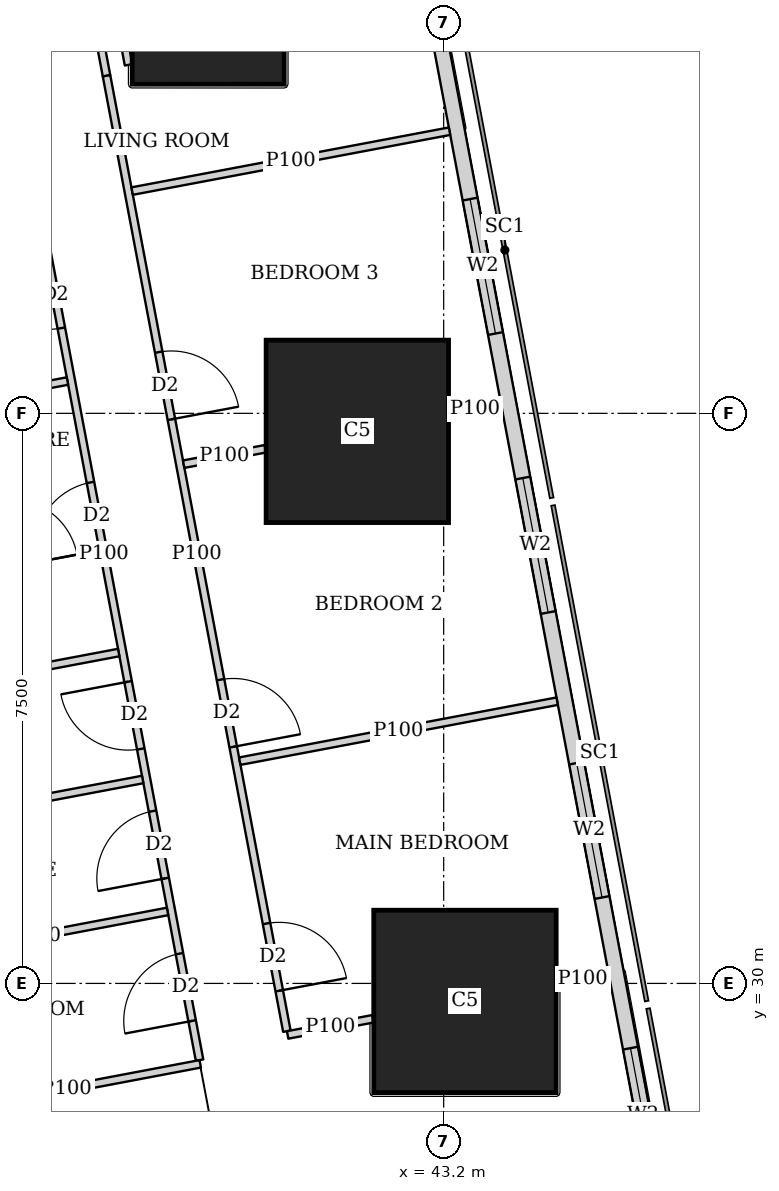
"""IFC4 building model, lengths in metres.
Left out: names, types, materials, properties, quantities, classifications, styles, units other than length and angle.
Written with IfcOpenShell. Run it as: python <this file> out.ifc"""

import sys

from ifc_helpers import new_model, si_unit, direction, frame, frame_2d, origin, origin_2d, place, context, subcontext, project, spatial, rectangle, extrude, element, fill, save


model = new_model("IFC4")
c1 = context("Model", 3, precision=1e-05, world=origin(), true_north=direction((0.0, 1.0)))
c2 = subcontext(c1, "Body", "Model", "MODEL_VIEW")
j1 = project(units=[si_unit("LENGTHUNIT", "METRE"), si_unit("PLANEANGLEUNIT", "RADIAN")], contexts=[c1])
p1 = place(None, origin())
s1 = spatial("IfcSite", under=j1, at=p1, CompositionType="ELEMENT")
p2 = place(p1, origin())
s2 = spatial("IfcBuilding", under=s1, at=p2, CompositionType="ELEMENT")
p3 = place(p2, frame((0.0, 0.0, 227.45)))
s3 = spatial("IfcBuildingStorey", under=s2, at=p3, CompositionType="ELEMENT", Elevation=227.45)
for number, where, z_axis, x_axis in (
    (1, (43.48, 29.763, 0.0), (0.0, 0.0, 1.0), (1.0, 0.0, 0.0)),
    (2, (42.064, 37.263, 0.0), (0.0, 0.0, 1.0), (1.0, 0.0, 0.0)),
):
    element("IfcColumn", number, at=place(p3, frame(where, z_axis=z_axis, x_axis=x_axis)), inside=s3, PredefinedType="COLUMN", context=c2, shape_type="SweptSolid", body=[
        extrude(rectangle(XDim=2.4, YDim=2.4, at=origin_2d()), origin(), (0.0, 0.0, 1.0), 3.75),
    ])
p4 = place(p3, frame((40.102, 42.83, 0.0), z_axis=(0.0, 0.0, 1.0), x_axis=(1.0, 0.0, 0.0)))
e3 = element("IfcColumn", 3, at=p4, inside=s3, PredefinedType="COLUMN", context=c2, shape_type="SweptSolid", body=[
    extrude(rectangle(XDim=2.0, YDim=2.0, at=origin_2d()), origin(), (0.0, 0.0, 1.0), 3.75),
])
p5 = place(p3, frame((50.653, 2.703, 0.0), z_axis=(0.0, 0.0, 1.0), x_axis=(-0.185612026696, 0.982623109613, 0.0)))
e4 = element("IfcWall", 4, at=p5, inside=s3, PredefinedType="SOLIDWALL", context=c2, shape_type="SweptSolid", body=[
    extrude(rectangle(XDim=41.393, YDim=0.2, at=frame_2d((20.697, 0.0))), origin(), (0.0, 0.0, 1.0), 3.5),
])
p6 = place(p5, frame((1.633, 0.0, 0.9)))
e5 = element("IfcOpeningElement", 5, at=p6, cuts=e4, PredefinedType="OPENING", context=c2, shape_type="SweptSolid", body=[
    extrude(rectangle(XDim=1.8, YDim=1.5, at=frame_2d((0.9, 0.75))), frame((0.0, 0.11, 0.0), z_axis=(0.0, -1.0, 0.0), x_axis=(1.0, 0.0, 0.0)), (0.0, 0.0, 1.0), 0.22),
])
p7 = place(p5, frame((6.032, 0.0, 0.9)))
e6 = element("IfcOpeningElement", 6, at=p7, cuts=e4, PredefinedType="OPENING", context=c2, shape_type="SweptSolid", body=[
    extrude(rectangle(XDim=1.8, YDim=1.5, at=frame_2d((0.9, 0.75))), frame((0.0, 0.11, 0.0), z_axis=(0.0, -1.0, 0.0), x_axis=(1.0, 0.0, 0.0)), (0.0, 0.0, 1.0), 0.22),
])
p8 = place(p5, frame((9.848, 0.0, 0.9)))
e7 = element("IfcOpeningElement", 7, at=p8, cuts=e4, PredefinedType="OPENING", context=c2, shape_type="SweptSolid", body=[
    extrude(rectangle(XDim=1.8, YDim=1.5, at=frame_2d((0.9, 0.75))), frame((0.0, 0.11, 0.0), z_axis=(0.0, -1.0, 0.0), x_axis=(1.0, 0.0, 0.0)), (0.0, 0.0, 1.0), 0.22),
])
p9 = place(p5, frame((13.664, 0.0, 0.9)))
e8 = element("IfcOpeningElement", 8, at=p9, cuts=e4, PredefinedType="OPENING", context=c2, shape_type="SweptSolid", body=[
    extrude(rectangle(XDim=1.8, YDim=1.5, at=frame_2d((0.9, 0.75))), frame((0.0, 0.11, 0.0), z_axis=(0.0, -1.0, 0.0), x_axis=(1.0, 0.0, 0.0)), (0.0, 0.0, 1.0), 0.22),
])
p10 = place(p5, frame((17.481, 0.0, 0.9)))
e9 = element("IfcOpeningElement", 9, at=p10, cuts=e4, PredefinedType="OPENING", context=c2, shape_type="SweptSolid", body=[
    extrude(rectangle(XDim=1.8, YDim=1.5, at=frame_2d((0.9, 0.75))), frame((0.0, 0.11, 0.0), z_axis=(0.0, -1.0, 0.0), x_axis=(1.0, 0.0, 0.0)), (0.0, 0.0, 1.0), 0.22),
])
p11 = place(p5, frame((21.297, 0.0, 0.9)))
e10 = element("IfcOpeningElement", 10, at=p11, cuts=e4, PredefinedType="OPENING", context=c2, shape_type="SweptSolid", body=[
    extrude(rectangle(XDim=1.8, YDim=1.5, at=frame_2d((0.9, 0.75))), frame((0.0, 0.11, 0.0), z_axis=(0.0, -1.0, 0.0), x_axis=(1.0, 0.0, 0.0)), (0.0, 0.0, 1.0), 0.22),
])
p12 = place(p5, frame((25.113, 0.0, 0.9)))
e11 = element("IfcOpeningElement", 11, at=p12, cuts=e4, PredefinedType="OPENING", context=c2, shape_type="SweptSolid", body=[
    extrude(rectangle(XDim=1.8, YDim=1.5, at=frame_2d((0.9, 0.75))), frame((0.0, 0.11, 0.0), z_axis=(0.0, -1.0, 0.0), x_axis=(1.0, 0.0, 0.0)), (0.0, 0.0, 1.0), 0.22),
])
p13 = place(p5, frame((28.93, 0.0, 0.9)))
e12 = element("IfcOpeningElement", 12, at=p13, cuts=e4, PredefinedType="OPENING", context=c2, shape_type="SweptSolid", body=[
    extrude(rectangle(XDim=1.8, YDim=1.5, at=frame_2d((0.9, 0.75))), frame((0.0, 0.11, 0.0), z_axis=(0.0, -1.0, 0.0), x_axis=(1.0, 0.0, 0.0)), (0.0, 0.0, 1.0), 0.22),
])
p14 = place(p5, frame((32.746, 0.0, 0.9)))
e13 = element("IfcOpeningElement", 13, at=p14, cuts=e4, PredefinedType="OPENING", context=c2, shape_type="SweptSolid", body=[
    extrude(rectangle(XDim=1.8, YDim=1.5, at=frame_2d((0.9, 0.75))), frame((0.0, 0.11, 0.0), z_axis=(0.0, -1.0, 0.0), x_axis=(1.0, 0.0, 0.0)), (0.0, 0.0, 1.0), 0.22),
])
p15 = place(p5, frame((36.481, 0.0, 0.9)))
e14 = element("IfcOpeningElement", 14, at=p15, cuts=e4, PredefinedType="OPENING", context=c2, shape_type="SweptSolid", body=[
    extrude(rectangle(XDim=1.8, YDim=1.5, at=frame_2d((0.9, 0.75))), frame((0.0, 0.11, 0.0), z_axis=(0.0, -1.0, 0.0), x_axis=(1.0, 0.0, 0.0)), (0.0, 0.0, 1.0), 0.22),
])
p16 = place(p3, frame((33.68, 42.723, 0.0), z_axis=(0.0, 0.0, 1.0), x_axis=(0.185601160014, -0.982625162207, 0.0)))
e15 = element("IfcWall", 15, at=p16, inside=s3, PredefinedType="SOLIDWALL", context=c2, shape_type="SweptSolid", body=[
    extrude(rectangle(XDim=41.051, YDim=0.15, at=frame_2d((20.526, 0.0))), origin(), (0.0, 0.0, 1.0), 2.5),
])
p17 = place(p16, frame((16.123, 0.0, 0.0)))
e16 = element("IfcOpeningElement", 16, at=p17, cuts=e15, PredefinedType="OPENING", context=c2, shape_type="SweptSolid", body=[
    extrude(rectangle(XDim=1.0, YDim=2.1, at=frame_2d((0.5, 1.05))), frame((0.0, 0.085, 0.0), z_axis=(0.0, -1.0, 0.0), x_axis=(1.0, 0.0, 0.0)), (0.0, 0.0, 1.0), 0.17),
])
p18 = place(p16, frame((19.938, 0.0, 0.0)))
e17 = element("IfcOpeningElement", 17, at=p18, cuts=e15, PredefinedType="OPENING", context=c2, shape_type="SweptSolid", body=[
    extrude(rectangle(XDim=1.0, YDim=2.1, at=frame_2d((0.5, 1.05))), frame((0.0, 0.085, 0.0), z_axis=(0.0, -1.0, 0.0), x_axis=(1.0, 0.0, 0.0)), (0.0, 0.0, 1.0), 0.17),
])
p19 = place(p16, frame((30.902, 0.0, 0.0)))
e18 = element("IfcOpeningElement", 18, at=p19, cuts=e15, PredefinedType="OPENING", context=c2, shape_type="SweptSolid", body=[
    extrude(rectangle(XDim=1.0, YDim=2.1, at=frame_2d((0.5, 1.05))), frame((0.0, 0.085, 0.0), z_axis=(0.0, -1.0, 0.0), x_axis=(1.0, 0.0, 0.0)), (0.0, 0.0, 1.0), 0.17),
])
p20 = place(p3, frame((39.054, 42.085, 0.0), z_axis=(0.0, 0.0, 1.0), x_axis=(-0.185791584218, 0.982589175207, 0.0)))
e19 = element("IfcWall", 19, at=p20, inside=s3, PredefinedType="PARTITIONING", context=c2, shape_type="SweptSolid", body=[
    extrude(rectangle(XDim=3.628, YDim=0.1, at=frame_2d((1.814, 0.0))), origin(), (0.0, 0.0, 1.0), 2.05),
])
p21 = place(p3, frame((38.256, 44.628, 0.0), z_axis=(0.0, 0.0, 1.0), x_axis=(0.185700639943, -0.982606366927, 0.0)))
e20 = element("IfcWall", 20, at=p21, inside=s3, PredefinedType="PARTITIONING", context=c2, shape_type="SweptSolid", body=[
    extrude(rectangle(XDim=2.735, YDim=0.1, at=frame_2d((1.367, 0.0))), origin(), (0.0, 0.0, 1.0), 2.05),
])
p22 = place(p3, frame((38.764, 41.941, 0.0), z_axis=(0.0, 0.0, 1.0), x_axis=(0.185512176227, -0.982641965556, 0.0)))
e21 = element("IfcWall", 21, at=p22, inside=s3, PredefinedType="PARTITIONING", context=c2, shape_type="SweptSolid", body=[
    extrude(rectangle(XDim=12.792, YDim=0.1, at=frame_2d((6.396, 0.0))), origin(), (0.0, 0.0, 1.0), 2.5),
])
p23 = place(p22, frame((11.35, 0.0, 0.0)))
e22 = element("IfcOpeningElement", 22, at=p23, cuts=e21, PredefinedType="OPENING", context=c2, shape_type="SweptSolid", body=[
    extrude(rectangle(XDim=0.9, YDim=2.1, at=frame_2d((0.45, 1.05))), frame((0.0, 0.06, 0.0), z_axis=(0.0, -1.0, 0.0), x_axis=(1.0, 0.0, 0.0)), (0.0, 0.0, 1.0), 0.12),
])
p24 = place(p22, frame((8.085, 0.0, 0.0)))
e23 = element("IfcOpeningElement", 23, at=p24, cuts=e21, PredefinedType="OPENING", context=c2, shape_type="SweptSolid", body=[
    extrude(rectangle(XDim=0.9, YDim=2.1, at=frame_2d((0.45, 1.05))), frame((0.0, 0.06, 0.0), z_axis=(0.0, -1.0, 0.0), x_axis=(1.0, 0.0, 0.0)), (0.0, 0.0, 1.0), 0.12),
])
p25 = place(p22, frame((3.7, 0.0, 0.0)))
e24 = element("IfcOpeningElement", 24, at=p25, cuts=e21, PredefinedType="OPENING", context=c2, shape_type="SweptSolid", body=[
    extrude(rectangle(XDim=0.9, YDim=2.1, at=frame_2d((0.45, 1.05))), frame((0.0, 0.06, 0.0), z_axis=(0.0, -1.0, 0.0), x_axis=(1.0, 0.0, 0.0)), (0.0, 0.0, 1.0), 0.12),
])
p26 = place(p3, frame((37.473, 42.309, 0.0), z_axis=(0.0, 0.0, 1.0), x_axis=(0.185570636839, -0.982630927024, 0.0)))
e25 = element("IfcWall", 25, at=p26, inside=s3, PredefinedType="PARTITIONING", context=c2, shape_type="SweptSolid", body=[
    extrude(rectangle(XDim=13.553, YDim=0.1, at=frame_2d((6.777, 0.0))), origin(), (0.0, 0.0, 1.0), 2.5),
])
p27 = place(p26, frame((12.128, 0.0, 0.0)))
e26 = element("IfcOpeningElement", 26, at=p27, cuts=e25, PredefinedType="OPENING", context=c2, shape_type="SweptSolid", body=[
    extrude(rectangle(XDim=0.9, YDim=2.1, at=frame_2d((0.45, 1.05))), frame((0.0, 0.06, 0.0), z_axis=(0.0, -1.0, 0.0), x_axis=(1.0, 0.0, 0.0)), (0.0, 0.0, 1.0), 0.12),
])
p28 = place(p26, frame((8.487, 0.0, 0.0)))
e27 = element("IfcOpeningElement", 27, at=p28, cuts=e25, PredefinedType="OPENING", context=c2, shape_type="SweptSolid", body=[
    extrude(rectangle(XDim=0.9, YDim=2.1, at=frame_2d((0.45, 1.05))), frame((0.0, 0.06, 0.0), z_axis=(0.0, -1.0, 0.0), x_axis=(1.0, 0.0, 0.0)), (0.0, 0.0, 1.0), 0.12),
])
p29 = place(p26, frame((2.853, 0.0, 0.0)))
e28 = element("IfcOpeningElement", 28, at=p29, cuts=e25, PredefinedType="OPENING", context=c2, shape_type="SweptSolid", body=[
    extrude(rectangle(XDim=0.9, YDim=2.1, at=frame_2d((0.45, 1.05))), frame((0.0, 0.06, 0.0), z_axis=(0.0, -1.0, 0.0), x_axis=(1.0, 0.0, 0.0)), (0.0, 0.0, 1.0), 0.12),
])
p30 = place(p26, frame((10.22, 0.0, 0.0)))
e29 = element("IfcOpeningElement", 29, at=p30, cuts=e25, PredefinedType="OPENING", context=c2, shape_type="SweptSolid", body=[
    extrude(rectangle(XDim=0.9, YDim=2.1, at=frame_2d((0.45, 1.05))), frame((0.0, 0.06, 0.0), z_axis=(0.0, -1.0, 0.0), x_axis=(1.0, 0.0, 0.0)), (0.0, 0.0, 1.0), 0.12),
])
p31 = place(p26, frame((5.819, 0.0, 0.0)))
e30 = element("IfcOpeningElement", 30, at=p31, cuts=e25, PredefinedType="OPENING", context=c2, shape_type="SweptSolid", body=[
    extrude(rectangle(XDim=0.9, YDim=2.1, at=frame_2d((0.45, 1.05))), frame((0.0, 0.06, 0.0), z_axis=(0.0, -1.0, 0.0), x_axis=(1.0, 0.0, 0.0)), (0.0, 0.0, 1.0), 0.12),
])
p32 = place(p3, frame((43.277, 41.212, 0.0), z_axis=(0.0, 0.0, 1.0), x_axis=(-0.982665405803, -0.185387972203, 0.0)))
e31 = element("IfcWall", 31, at=p32, inside=s3, PredefinedType="PARTITIONING", context=c2, shape_type="SweptSolid", body=[
    extrude(rectangle(XDim=4.25, YDim=0.1, at=frame_2d((2.125, 0.0))), origin(), (0.0, 0.0, 1.0), 2.05),
])
p33 = place(p3, frame((43.955, 37.62, 0.0), z_axis=(0.0, 0.0, 1.0), x_axis=(-0.982495415327, -0.186286765128, 0.0)))
e32 = element("IfcWall", 32, at=p33, inside=s3, PredefinedType="PARTITIONING", context=c2, shape_type="SweptSolid", body=[
    extrude(rectangle(XDim=0.693, YDim=0.1, at=frame_2d((0.347, 0.0))), origin(), (0.0, 0.0, 1.0), 3.5),
])
p34 = place(p3, frame((40.854, 37.034, 0.0), z_axis=(0.0, 0.0, 1.0), x_axis=(-0.982651678759, -0.185460718839, 0.0)))
e33 = element("IfcWall", 33, at=p34, inside=s3, PredefinedType="PARTITIONING", context=c2, shape_type="SweptSolid", body=[
    extrude(rectangle(XDim=1.094, YDim=0.1, at=frame_2d((0.547, 0.0))), origin(), (0.0, 0.0, 1.0), 3.5),
])
p35 = place(p3, frame((44.693, 33.713, 0.0), z_axis=(0.0, 0.0, 1.0), x_axis=(-0.982623519589, -0.185609856287, 0.0)))
e34 = element("IfcWall", 34, at=p35, inside=s3, PredefinedType="PARTITIONING", context=c2, shape_type="SweptSolid", body=[
    extrude(rectangle(XDim=4.25, YDim=0.1, at=frame_2d((2.125, 0.0))), origin(), (0.0, 0.0, 1.0), 2.05),
])
p36 = place(p3, frame((45.372, 30.121, 0.0), z_axis=(0.0, 0.0, 1.0), x_axis=(-0.98254419619, -0.186029305578, 0.0)))
e35 = element("IfcWall", 35, at=p36, inside=s3, PredefinedType="PARTITIONING", context=c2, shape_type="SweptSolid", body=[
    extrude(rectangle(XDim=0.694, YDim=0.1, at=frame_2d((0.347, 0.0))), origin(), (0.0, 0.0, 1.0), 3.5),
])
p37 = place(p3, frame((42.27, 29.535, 0.0), z_axis=(0.0, 0.0, 1.0), x_axis=(-0.982502700549, -0.186248338017, 0.0)))
e36 = element("IfcWall", 36, at=p37, inside=s3, PredefinedType="PARTITIONING", context=c2, shape_type="SweptSolid", body=[
    extrude(rectangle(XDim=1.143, YDim=0.1, at=frame_2d((0.572, 0.0))), origin(), (0.0, 0.0, 1.0), 2.5),
])
p38 = place(p3, frame((38.25, 37.925, 0.0), z_axis=(0.0, 0.0, 1.0), x_axis=(-0.982610209589, -0.185680305934, 0.0)))
e37 = element("IfcWall", 37, at=p38, inside=s3, PredefinedType="PARTITIONING", context=c2, shape_type="SweptSolid", body=[
    extrude(rectangle(XDim=1.567, YDim=0.1, at=frame_2d((0.784, 0.0))), origin(), (0.0, 0.0, 1.0), 3.5),
])
p39 = place(p3, frame((39.24, 32.683, 0.0), z_axis=(0.0, 0.0, 1.0), x_axis=(-0.982638553676, -0.185530247748, 0.0)))
e38 = element("IfcWall", 38, at=p39, inside=s3, PredefinedType="PARTITIONING", context=c2, shape_type="SweptSolid", body=[
    extrude(rectangle(XDim=3.525, YDim=0.1, at=frame_2d((1.763, 0.0))), origin(), (0.0, 0.0, 1.0), 3.5),
])
p40 = place(p3, frame((39.997, 28.942, 0.0), z_axis=(0.0, 0.0, 1.0), x_axis=(-0.982613029841, -0.185665380691, 0.0)))
e39 = element("IfcWall", 39, at=p40, inside=s3, PredefinedType="PARTITIONING", context=c2, shape_type="SweptSolid", body=[
    extrude(rectangle(XDim=3.575, YDim=0.1, at=frame_2d((1.788, 0.0))), origin(), (0.0, 0.0, 1.0), 3.5),
])
p41 = place(p3, frame((39.567, 30.947, 0.0), z_axis=(0.0, 0.0, 1.0), x_axis=(-0.982576058723, -0.185860939478, 0.0)))
e40 = element("IfcWall", 40, at=p41, inside=s3, PredefinedType="PARTITIONING", context=c2, shape_type="SweptSolid", body=[
    extrude(rectangle(XDim=3.524, YDim=0.1, at=frame_2d((1.762, 0.0))), origin(), (0.0, 0.0, 1.0), 2.5),
])
p42 = place(p3, frame((38.924, 34.353, 0.0), z_axis=(0.0, 0.0, 1.0), x_axis=(-0.982629014545, -0.18558076348, 0.0)))
e41 = element("IfcWall", 41, at=p42, inside=s3, PredefinedType="PARTITIONING", context=c2, shape_type="SweptSolid", body=[
    extrude(rectangle(XDim=3.524, YDim=0.1, at=frame_2d((1.762, 0.0))), origin(), (0.0, 0.0, 1.0), 3.5),
])
p43 = place(p12, origin())
e42 = element("IfcWindow", 42, at=p43, inside=s3, PartitioningType="SINGLE_PANEL", PredefinedType="WINDOW", context=c2, shape_type="SweptSolid", body=[
    extrude(rectangle(XDim=1.8, YDim=1.5, at=frame_2d((0.9, 0.75))), frame((0.0, 0.03, 0.0), z_axis=(0.0, -1.0, 0.0), x_axis=(1.0, 0.0, 0.0)), (0.0, 0.0, 1.0), 0.06),
])
fill(e11, e42)
p44 = place(p13, origin())
e43 = element("IfcWindow", 43, at=p44, inside=s3, PartitioningType="SINGLE_PANEL", PredefinedType="WINDOW", context=c2, shape_type="SweptSolid", body=[
    extrude(rectangle(XDim=1.8, YDim=1.5, at=frame_2d((0.9, 0.75))), frame((0.0, 0.03, 0.0), z_axis=(0.0, -1.0, 0.0), x_axis=(1.0, 0.0, 0.0)), (0.0, 0.0, 1.0), 0.06),
])
fill(e12, e43)
p45 = place(p14, origin())
e44 = element("IfcWindow", 44, at=p45, inside=s3, PartitioningType="SINGLE_PANEL", PredefinedType="WINDOW", context=c2, shape_type="SweptSolid", body=[
    extrude(rectangle(XDim=1.8, YDim=1.5, at=frame_2d((0.9, 0.75))), frame((0.0, 0.03, 0.0), z_axis=(0.0, -1.0, 0.0), x_axis=(1.0, 0.0, 0.0)), (0.0, 0.0, 1.0), 0.06),
])
fill(e13, e44)
p46 = place(p15, origin())
e45 = element("IfcWindow", 45, at=p46, inside=s3, PartitioningType="SINGLE_PANEL", PredefinedType="WINDOW", context=c2, shape_type="SweptSolid", body=[
    extrude(rectangle(XDim=1.8, YDim=1.5, at=frame_2d((0.9, 0.75))), frame((0.0, 0.03, 0.0), z_axis=(0.0, -1.0, 0.0), x_axis=(1.0, 0.0, 0.0)), (0.0, 0.0, 1.0), 0.06),
])
fill(e14, e45)
p47 = place(p23, origin())
e46 = element("IfcDoor", 46, at=p47, inside=s3, OperationType="SINGLE_SWING_RIGHT", PredefinedType="DOOR", context=c2, shape_type="SweptSolid", body=[
    extrude(rectangle(XDim=0.9, YDim=2.1, at=frame_2d((0.45, 1.05))), frame((0.0, 0.025, 0.0), z_axis=(0.0, -1.0, 0.0), x_axis=(1.0, 0.0, 0.0)), (0.0, 0.0, 1.0), 0.05),
])
fill(e22, e46)
p48 = place(p24, origin())
e47 = element("IfcDoor", 47, at=p48, inside=s3, OperationType="SINGLE_SWING_RIGHT", PredefinedType="DOOR", context=c2, shape_type="SweptSolid", body=[
    extrude(rectangle(XDim=0.9, YDim=2.1, at=frame_2d((0.45, 1.05))), frame((0.0, 0.025, 0.0), z_axis=(0.0, -1.0, 0.0), x_axis=(1.0, 0.0, 0.0)), (0.0, 0.0, 1.0), 0.05),
])
fill(e23, e47)
p49 = place(p25, origin())
e48 = element("IfcDoor", 48, at=p49, inside=s3, OperationType="SINGLE_SWING_RIGHT", PredefinedType="DOOR", context=c2, shape_type="SweptSolid", body=[
    extrude(rectangle(XDim=0.9, YDim=2.1, at=frame_2d((0.45, 1.05))), frame((0.0, 0.025, 0.0), z_axis=(0.0, -1.0, 0.0), x_axis=(1.0, 0.0, 0.0)), (0.0, 0.0, 1.0), 0.05),
])
fill(e24, e48)
p50 = place(p27, origin())
e49 = element("IfcDoor", 49, at=p50, inside=s3, OperationType="SINGLE_SWING_LEFT", PredefinedType="DOOR", context=c2, shape_type="SweptSolid", body=[
    extrude(rectangle(XDim=0.9, YDim=2.1, at=frame_2d((0.45, 1.05))), frame((0.0, 0.025, 0.0), z_axis=(0.0, -1.0, 0.0), x_axis=(1.0, 0.0, 0.0)), (0.0, 0.0, 1.0), 0.05),
])
fill(e26, e49)
p51 = place(p28, origin())
e50 = element("IfcDoor", 50, at=p51, inside=s3, OperationType="SINGLE_SWING_RIGHT", PredefinedType="DOOR", context=c2, shape_type="SweptSolid", body=[
    extrude(rectangle(XDim=0.9, YDim=2.1, at=frame_2d((0.45, 1.05))), frame((0.0, 0.025, 0.0), z_axis=(0.0, -1.0, 0.0), x_axis=(1.0, 0.0, 0.0)), (0.0, 0.0, 1.0), 0.05),
])
fill(e27, e50)
p52 = place(p29, origin())
e51 = element("IfcDoor", 51, at=p52, inside=s3, OperationType="SINGLE_SWING_RIGHT", PredefinedType="DOOR", context=c2, shape_type="SweptSolid", body=[
    extrude(rectangle(XDim=0.9, YDim=2.1, at=frame_2d((0.45, 1.05))), frame((0.0, 0.025, 0.0), z_axis=(0.0, -1.0, 0.0), x_axis=(1.0, 0.0, 0.0)), (0.0, 0.0, 1.0), 0.05),
])
fill(e28, e51)
p53 = place(p30, origin())
e52 = element("IfcDoor", 52, at=p53, inside=s3, OperationType="SINGLE_SWING_LEFT", PredefinedType="DOOR", context=c2, shape_type="SweptSolid", body=[
    extrude(rectangle(XDim=0.9, YDim=2.1, at=frame_2d((0.45, 1.05))), frame((0.0, 0.025, 0.0), z_axis=(0.0, -1.0, 0.0), x_axis=(1.0, 0.0, 0.0)), (0.0, 0.0, 1.0), 0.05),
])
fill(e29, e52)
p54 = place(p31, origin())
e53 = element("IfcDoor", 53, at=p54, inside=s3, OperationType="SINGLE_SWING_LEFT", PredefinedType="DOOR", context=c2, shape_type="SweptSolid", body=[
    extrude(rectangle(XDim=0.9, YDim=2.1, at=frame_2d((0.45, 1.05))), frame((0.0, 0.025, 0.0), z_axis=(0.0, -1.0, 0.0), x_axis=(1.0, 0.0, 0.0)), (0.0, 0.0, 1.0), 0.05),
])
fill(e30, e53)
save(model, sys.argv[1])
